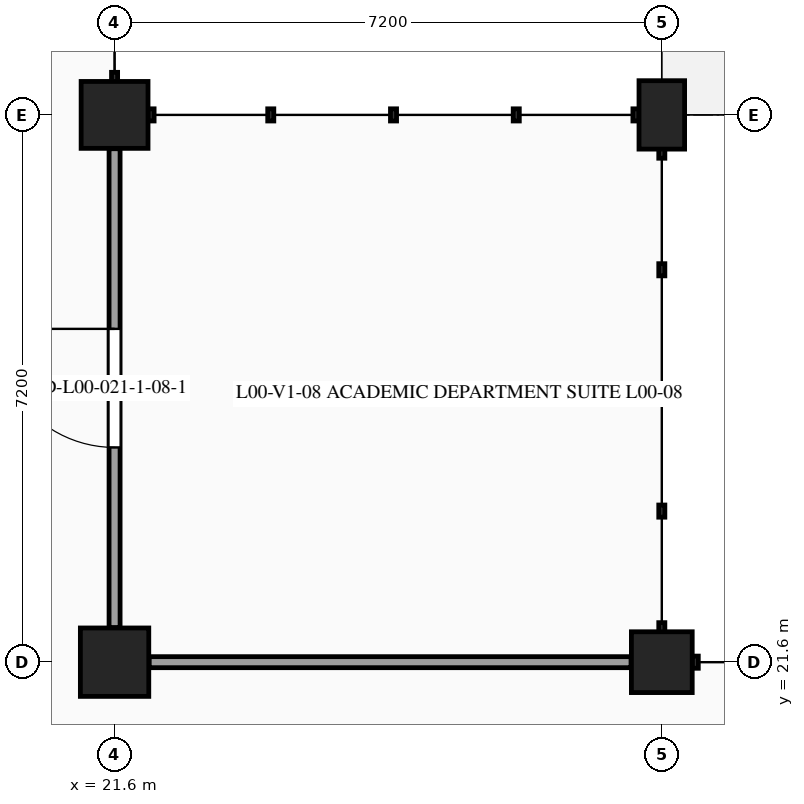
"""IFC4 building model, lengths in metres.
Left out: names, types, materials, properties, quantities, classifications, styles, units other than length and angle.
Written with IfcOpenShell. Run it as: python <this file> out.ifc"""

import sys

from ifc_helpers import new_model, si_unit, direction, frame, frame_2d, origin, origin_2d, place, context, subcontext, project, spatial, rectangle, extrude, element, fill, save


model = new_model("IFC4")
c1 = context("Model", 3, precision=1e-05, world=origin(), true_north=direction((0.0, 1.0)))
c2 = subcontext(c1, "Body", "Model", "MODEL_VIEW")
j1 = project(units=[si_unit("LENGTHUNIT", "METRE"), si_unit("PLANEANGLEUNIT", "RADIAN")], contexts=[c1])
p1 = place(None, origin())
s1 = spatial("IfcSite", under=j1, at=p1, CompositionType="ELEMENT")
p2 = place(p1, origin())
s2 = spatial("IfcBuilding", under=s1, at=p2, CompositionType="ELEMENT")
p3 = place(p2, origin())
s3 = spatial("IfcBuildingStorey", under=s2, at=p3, CompositionType="ELEMENT", Elevation=0.0)
p4 = place(p3, frame((21.6, 21.6, 0.0), z_axis=(0.0, 0.0, 1.0), x_axis=(1.0, 0.0, 0.0)))
e1 = element("IfcColumn", 1, at=p4, inside=s3, PredefinedType="COLUMN", context=c2, shape_type="SweptSolid", body=[
    extrude(rectangle(XDim=0.9, YDim=0.9, at=origin_2d()), origin(), (0.0, 0.0, 1.0), 5.4),
])
p5 = place(p3, frame((21.6, 28.8, 0.0), z_axis=(0.0, 0.0, 1.0), x_axis=(1.0, 0.0, 0.0)))
e2 = element("IfcColumn", 2, at=p5, inside=s3, PredefinedType="COLUMN", context=c2, shape_type="SweptSolid", body=[
    extrude(rectangle(XDim=0.88, YDim=0.88, at=origin_2d()), origin(), (0.0, 0.0, 1.0), 5.4),
])
p6 = place(p3, frame((28.8, 21.6, 0.0), z_axis=(0.0, 0.0, 1.0), x_axis=(1.0, 0.0, 0.0)))
e3 = element("IfcColumn", 3, at=p6, inside=s3, PredefinedType="COLUMN", context=c2, shape_type="SweptSolid", body=[
    extrude(rectangle(XDim=0.8, YDim=0.8, at=origin_2d()), origin(), (0.0, 0.0, 1.0), 5.4),
])
p7 = place(p3, frame((28.8, 28.8, 0.0), z_axis=(0.0, 0.0, 1.0), x_axis=(1.0, 0.0, 0.0)))
e4 = element("IfcColumn", 4, at=p7, inside=s3, PredefinedType="COLUMN", context=c2, shape_type="SweptSolid", body=[
    extrude(rectangle(XDim=0.6, YDim=0.9, at=origin_2d()), origin(), (0.0, 0.0, 1.0), 5.4),
])
p8 = place(p3, frame((21.6, 22.055, 0.0), z_axis=(0.0, 0.0, 1.0), x_axis=(0.0, 1.0, 0.0)))
e5 = element("IfcWall", 5, at=p8, inside=s3, PredefinedType="PARTITIONING", context=c2, shape_type="SweptSolid", body=[
    extrude(rectangle(XDim=6.3, YDim=0.145, at=frame_2d((3.15, 0.0))), origin(), (0.0, 0.0, 1.0), 4.4),
])
p9 = place(p8, frame((2.37, 0.0, 0.0)))
e6 = element("IfcOpeningElement", 6, at=p9, cuts=e5, PredefinedType="OPENING", context=c2, shape_type="SweptSolid", body=[
    extrude(rectangle(XDim=1.56, YDim=2.25, at=frame_2d((0.78, 1.125))), frame((0.0, 0.083, 0.0), z_axis=(0.0, -1.0, 0.0), x_axis=(1.0, 0.0, 0.0)), (0.0, 0.0, 1.0), 0.165),
])
p10 = place(p3, frame((22.055, 21.6, 0.0), z_axis=(0.0, 0.0, 1.0), x_axis=(1.0, 0.0, 0.0)))
e7 = element("IfcWall", 7, at=p10, inside=s3, PredefinedType="PARTITIONING", context=c2, shape_type="SweptSolid", body=[
    extrude(rectangle(XDim=6.34, YDim=0.145, at=frame_2d((3.17, 0.0))), origin(), (0.0, 0.0, 1.0), 4.365),
])
p11 = place(p9, origin())
e8 = element("IfcDoor", 8, at=p11, inside=s3, OperationType="SINGLE_SWING_RIGHT", PredefinedType="DOOR", context=c2, shape_type="SweptSolid", body=[
    extrude(rectangle(XDim=1.56, YDim=2.25, at=frame_2d((0.78, 1.125))), frame((0.0, 0.025, 0.0), z_axis=(0.0, -1.0, 0.0), x_axis=(1.0, 0.0, 0.0)), (0.0, 0.0, 1.0), 0.05),
])
fill(e6, e8)
save(model, sys.argv[1])
